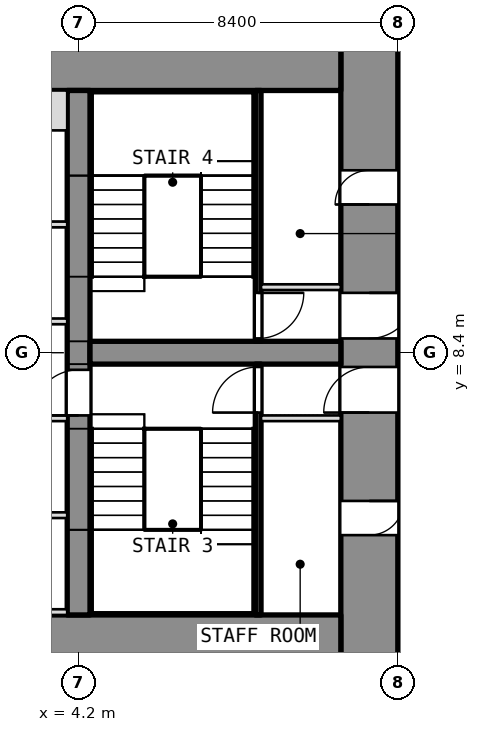
"""IFC4 building model, lengths in metres.
Left out: names, types, materials, properties, quantities, classifications, styles, units other than length and angle.
Written with IfcOpenShell. Run it as: python <this file> out.ifc"""

import sys

from ifc_helpers import new_model, si_unit, direction, frame, frame_2d, origin, place, context, subcontext, project, spatial, rectangle, extrude, element, fill, save


model = new_model("IFC4")
c1 = context("Model", 3, precision=1e-05, world=origin(), true_north=direction((0.0, 1.0)))
c2 = subcontext(c1, "Body", "Model", "MODEL_VIEW")
j1 = project(units=[si_unit("LENGTHUNIT", "METRE"), si_unit("PLANEANGLEUNIT", "RADIAN")], contexts=[c1])
p1 = place(None, origin())
s1 = spatial("IfcSite", under=j1, at=p1, CompositionType="ELEMENT")
p2 = place(p1, origin())
s2 = spatial("IfcBuilding", under=s1, at=p2, CompositionType="ELEMENT")
p3 = place(p2, frame((0.0, 0.0, 8.0)))
s3 = spatial("IfcBuildingStorey", under=s2, at=p3, CompositionType="ELEMENT", Elevation=8.0)
p4 = place(p3, frame((11.85, 0.0, 0.0), z_axis=(0.0, 0.0, 1.0), x_axis=(0.0, 1.0, 0.0)))
e1 = element("IfcWall", 1, at=p4, inside=s3, PredefinedType="SHEAR", context=c2, shape_type="SweptSolid", body=[
    extrude(rectangle(XDim=16.8, YDim=1.5, at=frame_2d((8.4, 0.0))), origin(), (0.0, 0.0, 1.0), 5.0),
])
p5 = place(p4, frame((3.6, 0.0, 0.0)))
e2 = element("IfcOpeningElement", 2, at=p5, cuts=e1, PredefinedType="OPENING", context=c2, shape_type="SweptSolid", body=[
    extrude(rectangle(XDim=0.9, YDim=2.1, at=frame_2d((0.45, 1.05))), frame((0.0, 0.75, 0.0), z_axis=(0.0, -1.0, 0.0), x_axis=(1.0, 0.0, 0.0)), (0.0, 0.0, 1.0), 1.5),
])
p6 = place(p4, frame((6.825, 0.0, 0.0)))
e3 = element("IfcOpeningElement", 3, at=p6, cuts=e1, PredefinedType="OPENING", context=c2, shape_type="SweptSolid", body=[
    extrude(rectangle(XDim=1.2, YDim=2.1, at=frame_2d((0.6, 1.05))), frame((0.0, 0.75, 0.0), z_axis=(0.0, -1.0, 0.0), x_axis=(1.0, 0.0, 0.0)), (0.0, 0.0, 1.0), 1.5),
])
p7 = place(p4, frame((12.3, 0.0, 0.0)))
e4 = element("IfcOpeningElement", 4, at=p7, cuts=e1, PredefinedType="OPENING", context=c2, shape_type="SweptSolid", body=[
    extrude(rectangle(XDim=0.9, YDim=2.1, at=frame_2d((0.45, 1.05))), frame((0.0, 0.75, 0.0), z_axis=(0.0, -1.0, 0.0), x_axis=(1.0, 0.0, 0.0)), (0.0, 0.0, 1.0), 1.5),
])
p8 = place(p4, frame((8.775, 0.0, 0.0)))
e5 = element("IfcOpeningElement", 5, at=p8, cuts=e1, PredefinedType="OPENING", context=c2, shape_type="SweptSolid", body=[
    extrude(rectangle(XDim=1.2, YDim=2.1, at=frame_2d((0.6, 1.05))), frame((0.0, 0.75, 0.0), z_axis=(0.0, -1.0, 0.0), x_axis=(1.0, 0.0, 0.0)), (0.0, 0.0, 1.0), 1.5),
])
for number, where, z_axis, x_axis in (
    (6, (-11.1, 0.75, 0.0), (0.0, 0.0, 1.0), (1.0, 0.0, 0.0)),
    (7, (-11.1, 16.05, 0.0), (0.0, 0.0, 1.0), (1.0, 0.0, 0.0)),
):
    element("IfcWall", number, at=place(p3, frame(where, z_axis=z_axis, x_axis=x_axis)), inside=s3, PredefinedType="SHEAR", context=c2, shape_type="SweptSolid", body=[
        extrude(rectangle(XDim=22.2, YDim=1.5, at=frame_2d((11.1, 0.0))), origin(), (0.0, 0.0, 1.0), 5.0),
    ])
p9 = place(p3, frame((4.2, 1.5, 0.0), z_axis=(0.0, 0.0, 1.0), x_axis=(0.0, 1.0, 0.0)))
e8 = element("IfcWall", 8, at=p9, inside=s3, PredefinedType="SHEAR", context=c2, shape_type="SweptSolid", body=[
    extrude(rectangle(XDim=13.8, YDim=0.6, at=frame_2d((6.9, 0.0))), origin(), (0.0, 0.0, 1.0), 5.0),
])
p10 = place(p9, frame((5.25, 0.0, 0.0)))
e9 = element("IfcOpeningElement", 9, at=p10, cuts=e8, PredefinedType="OPENING", context=c2, shape_type="SweptSolid", body=[
    extrude(rectangle(XDim=1.2, YDim=2.1, at=frame_2d((0.6, 1.05))), frame((0.0, 0.3, 0.0), z_axis=(0.0, -1.0, 0.0), x_axis=(1.0, 0.0, 0.0)), (0.0, 0.0, 1.0), 0.6),
])
p11 = place(p3, frame((4.5, 8.4, 0.0), z_axis=(0.0, 0.0, 1.0), x_axis=(1.0, 0.0, 0.0)))
e10 = element("IfcWall", 10, at=p11, inside=s3, PredefinedType="SHEAR", context=c2, shape_type="SweptSolid", body=[
    extrude(rectangle(XDim=6.6, YDim=0.6, at=frame_2d((3.3, 0.0))), origin(), (0.0, 0.0, 1.0), 5.0),
])
p12 = place(p3, frame((8.925, 1.5, 0.0), z_axis=(0.0, 0.0, 1.0), x_axis=(0.0, 1.0, 0.0)))
e11 = element("IfcWall", 11, at=p12, inside=s3, PredefinedType="SHEAR", context=c2, shape_type="SweptSolid", body=[
    extrude(rectangle(XDim=6.6, YDim=0.15, at=frame_2d((3.3, 0.0))), origin(), (0.0, 0.0, 1.0), 4.78),
])
p13 = place(p12, frame((5.325, 0.0, 0.0)))
e12 = element("IfcOpeningElement", 12, at=p13, cuts=e11, PredefinedType="OPENING", context=c2, shape_type="SweptSolid", body=[
    extrude(rectangle(XDim=1.2, YDim=2.1, at=frame_2d((0.6, 1.05))), frame((0.0, 0.075, 0.0), z_axis=(0.0, -1.0, 0.0), x_axis=(1.0, 0.0, 0.0)), (0.0, 0.0, 1.0), 0.15),
])
p14 = place(p3, frame((9.0, 6.675, 0.0), z_axis=(0.0, 0.0, 1.0), x_axis=(1.0, 0.0, 0.0)))
e13 = element("IfcWall", 13, at=p14, inside=s3, PredefinedType="PARTITIONING", context=c2, shape_type="SweptSolid", body=[
    extrude(rectangle(XDim=2.1, YDim=0.15, at=frame_2d((1.05, 0.0))), origin(), (0.0, 0.0, 1.0), 4.78),
])
p15 = place(p3, frame((8.925, 8.7, 0.0), z_axis=(0.0, 0.0, 1.0), x_axis=(0.0, 1.0, 0.0)))
e14 = element("IfcWall", 14, at=p15, inside=s3, PredefinedType="SHEAR", context=c2, shape_type="SweptSolid", body=[
    extrude(rectangle(XDim=6.6, YDim=0.15, at=frame_2d((3.3, 0.0))), origin(), (0.0, 0.0, 1.0), 4.78),
])
p16 = place(p15, frame((0.075, 0.0, 0.0)))
e15 = element("IfcOpeningElement", 15, at=p16, cuts=e14, PredefinedType="OPENING", context=c2, shape_type="SweptSolid", body=[
    extrude(rectangle(XDim=1.2, YDim=2.1, at=frame_2d((0.6, 1.05))), frame((0.0, 0.075, 0.0), z_axis=(0.0, -1.0, 0.0), x_axis=(1.0, 0.0, 0.0)), (0.0, 0.0, 1.0), 0.15),
])
p17 = place(p3, frame((9.0, 10.125, 0.0), z_axis=(0.0, 0.0, 1.0), x_axis=(1.0, 0.0, 0.0)))
e16 = element("IfcWall", 16, at=p17, inside=s3, PredefinedType="PARTITIONING", context=c2, shape_type="SweptSolid", body=[
    extrude(rectangle(XDim=2.1, YDim=0.15, at=frame_2d((1.05, 0.0))), origin(), (0.0, 0.0, 1.0), 4.78),
])
p18 = place(p3, frame((-3.9, 4.125, 0.0), z_axis=(0.0, 0.0, 1.0), x_axis=(1.0, 0.0, 0.0)))
e17 = element("IfcWall", 17, at=p18, inside=s3, PredefinedType="PARTITIONING", context=c2, shape_type="SweptSolid", body=[
    extrude(rectangle(XDim=7.8, YDim=0.15, at=frame_2d((3.9, 0.0))), origin(), (0.0, 0.0, 1.0), 4.78),
])
p19 = place(p18, frame((3.75, 0.0, 0.0)))
e18 = element("IfcOpeningElement", 18, at=p19, cuts=e17, PredefinedType="OPENING", context=c2, shape_type="SweptSolid", body=[
    extrude(rectangle(XDim=1.2, YDim=2.1, at=frame_2d((0.6, 1.05))), frame((0.0, 0.075, 0.0), z_axis=(0.0, -1.0, 0.0), x_axis=(1.0, 0.0, 0.0)), (0.0, 0.0, 1.0), 0.15),
])
p20 = place(p3, frame((-3.9, 11.775, 0.0), z_axis=(0.0, 0.0, 1.0), x_axis=(1.0, 0.0, 0.0)))
e19 = element("IfcWall", 19, at=p20, inside=s3, PredefinedType="PARTITIONING", context=c2, shape_type="SweptSolid", body=[
    extrude(rectangle(XDim=7.8, YDim=0.15, at=frame_2d((3.9, 0.0))), origin(), (0.0, 0.0, 1.0), 4.78),
])
p21 = place(p20, frame((3.3, 0.0, 0.0)))
e20 = element("IfcOpeningElement", 20, at=p21, cuts=e19, PredefinedType="OPENING", context=c2, shape_type="SweptSolid", body=[
    extrude(rectangle(XDim=1.2, YDim=2.1, at=frame_2d((0.6, 1.05))), frame((0.0, 0.075, 0.0), z_axis=(0.0, -1.0, 0.0), x_axis=(1.0, 0.0, 0.0)), (0.0, 0.0, 1.0), 0.15),
])
p22 = place(p3, frame((1.65, 1.575, 0.0), z_axis=(0.0, 0.0, 1.0), x_axis=(1.0, 0.0, 0.0)))
e21 = element("IfcWall", 21, at=p22, inside=s3, PredefinedType="SHEAR", context=c2, shape_type="SweptSolid", body=[
    extrude(rectangle(XDim=2.25, YDim=0.15, at=frame_2d((1.125, 0.0))), origin(), (0.0, 0.0, 1.0), 5.0),
])
p23 = place(p3, frame((1.65, 14.775, 0.0), z_axis=(0.0, 0.0, 1.0), x_axis=(1.0, 0.0, 0.0)))
e22 = element("IfcWall", 22, at=p23, inside=s3, PredefinedType="SHEAR", context=c2, shape_type="SweptSolid", body=[
    extrude(rectangle(XDim=2.25, YDim=1.05, at=frame_2d((1.125, 0.0))), origin(), (0.0, 0.0, 1.0), 5.0),
])
for number, where, z_axis, x_axis in (
    (23, (1.65, 6.675, 0.0), (0.0, 0.0, 1.0), (1.0, 0.0, 0.0)),
    (24, (1.65, 9.225, 0.0), (0.0, 0.0, 1.0), (1.0, 0.0, 0.0)),
):
    element("IfcWall", number, at=place(p3, frame(where, z_axis=z_axis, x_axis=x_axis)), inside=s3, PredefinedType="SHEAR", context=c2, shape_type="SweptSolid", body=[
        extrude(rectangle(XDim=2.25, YDim=0.15, at=frame_2d((1.125, 0.0))), origin(), (0.0, 0.0, 1.0), 5.0),
    ])
p24 = place(p5, origin())
e25 = element("IfcDoor", 25, at=p24, inside=s3, OperationType="SINGLE_SWING_LEFT", PredefinedType="DOOR", context=c2, shape_type="SweptSolid", body=[
    extrude(rectangle(XDim=0.9, YDim=2.1, at=frame_2d((0.45, 1.05))), frame((0.0, 0.025, 0.0), z_axis=(0.0, -1.0, 0.0), x_axis=(1.0, 0.0, 0.0)), (0.0, 0.0, 1.0), 0.05),
])
fill(e2, e25)
p25 = place(p6, origin())
e26 = element("IfcDoor", 26, at=p25, inside=s3, OperationType="SINGLE_SWING_LEFT", PredefinedType="DOOR", context=c2, shape_type="SweptSolid", body=[
    extrude(rectangle(XDim=1.2, YDim=2.1, at=frame_2d((0.6, 1.05))), frame((0.0, 0.025, 0.0), z_axis=(0.0, -1.0, 0.0), x_axis=(1.0, 0.0, 0.0)), (0.0, 0.0, 1.0), 0.05),
])
fill(e3, e26)
p26 = place(p13, origin())
e27 = element("IfcDoor", 27, at=p26, inside=s3, OperationType="SINGLE_SWING_LEFT", PredefinedType="DOOR", context=c2, shape_type="SweptSolid", body=[
    extrude(rectangle(XDim=1.2, YDim=2.1, at=frame_2d((0.6, 1.05))), frame((0.0, 0.025, 0.0), z_axis=(0.0, -1.0, 0.0), x_axis=(1.0, 0.0, 0.0)), (0.0, 0.0, 1.0), 0.05),
])
fill(e12, e27)
p27 = place(p7, origin())
e28 = element("IfcDoor", 28, at=p27, inside=s3, OperationType="SINGLE_SWING_LEFT", PredefinedType="DOOR", context=c2, shape_type="SweptSolid", body=[
    extrude(rectangle(XDim=0.9, YDim=2.1, at=frame_2d((0.45, 1.05))), frame((0.0, 0.025, 0.0), z_axis=(0.0, -1.0, 0.0), x_axis=(1.0, 0.0, 0.0)), (0.0, 0.0, 1.0), 0.05),
])
fill(e4, e28)
p28 = place(p8, origin())
e29 = element("IfcDoor", 29, at=p28, inside=s3, OperationType="SINGLE_SWING_LEFT", PredefinedType="DOOR", context=c2, shape_type="SweptSolid", body=[
    extrude(rectangle(XDim=1.2, YDim=2.1, at=frame_2d((0.6, 1.05))), frame((0.0, 0.025, 0.0), z_axis=(0.0, -1.0, 0.0), x_axis=(1.0, 0.0, 0.0)), (0.0, 0.0, 1.0), 0.05),
])
fill(e5, e29)
p29 = place(p16, origin())
e30 = element("IfcDoor", 30, at=p29, inside=s3, OperationType="SINGLE_SWING_LEFT", PredefinedType="DOOR", context=c2, shape_type="SweptSolid", body=[
    extrude(rectangle(XDim=1.2, YDim=2.1, at=frame_2d((0.6, 1.05))), frame((0.0, 0.025, 0.0), z_axis=(0.0, -1.0, 0.0), x_axis=(1.0, 0.0, 0.0)), (0.0, 0.0, 1.0), 0.05),
])
fill(e15, e30)
p30 = place(p10, origin())
e31 = element("IfcDoor", 31, at=p30, inside=s3, OperationType="SINGLE_SWING_LEFT", PredefinedType="DOOR", context=c2, shape_type="SweptSolid", body=[
    extrude(rectangle(XDim=1.2, YDim=2.1, at=frame_2d((0.6, 1.05))), frame((0.0, 0.025, 0.0), z_axis=(0.0, -1.0, 0.0), x_axis=(1.0, 0.0, 0.0)), (0.0, 0.0, 1.0), 0.05),
])
fill(e9, e31)
save(model, sys.argv[1])
